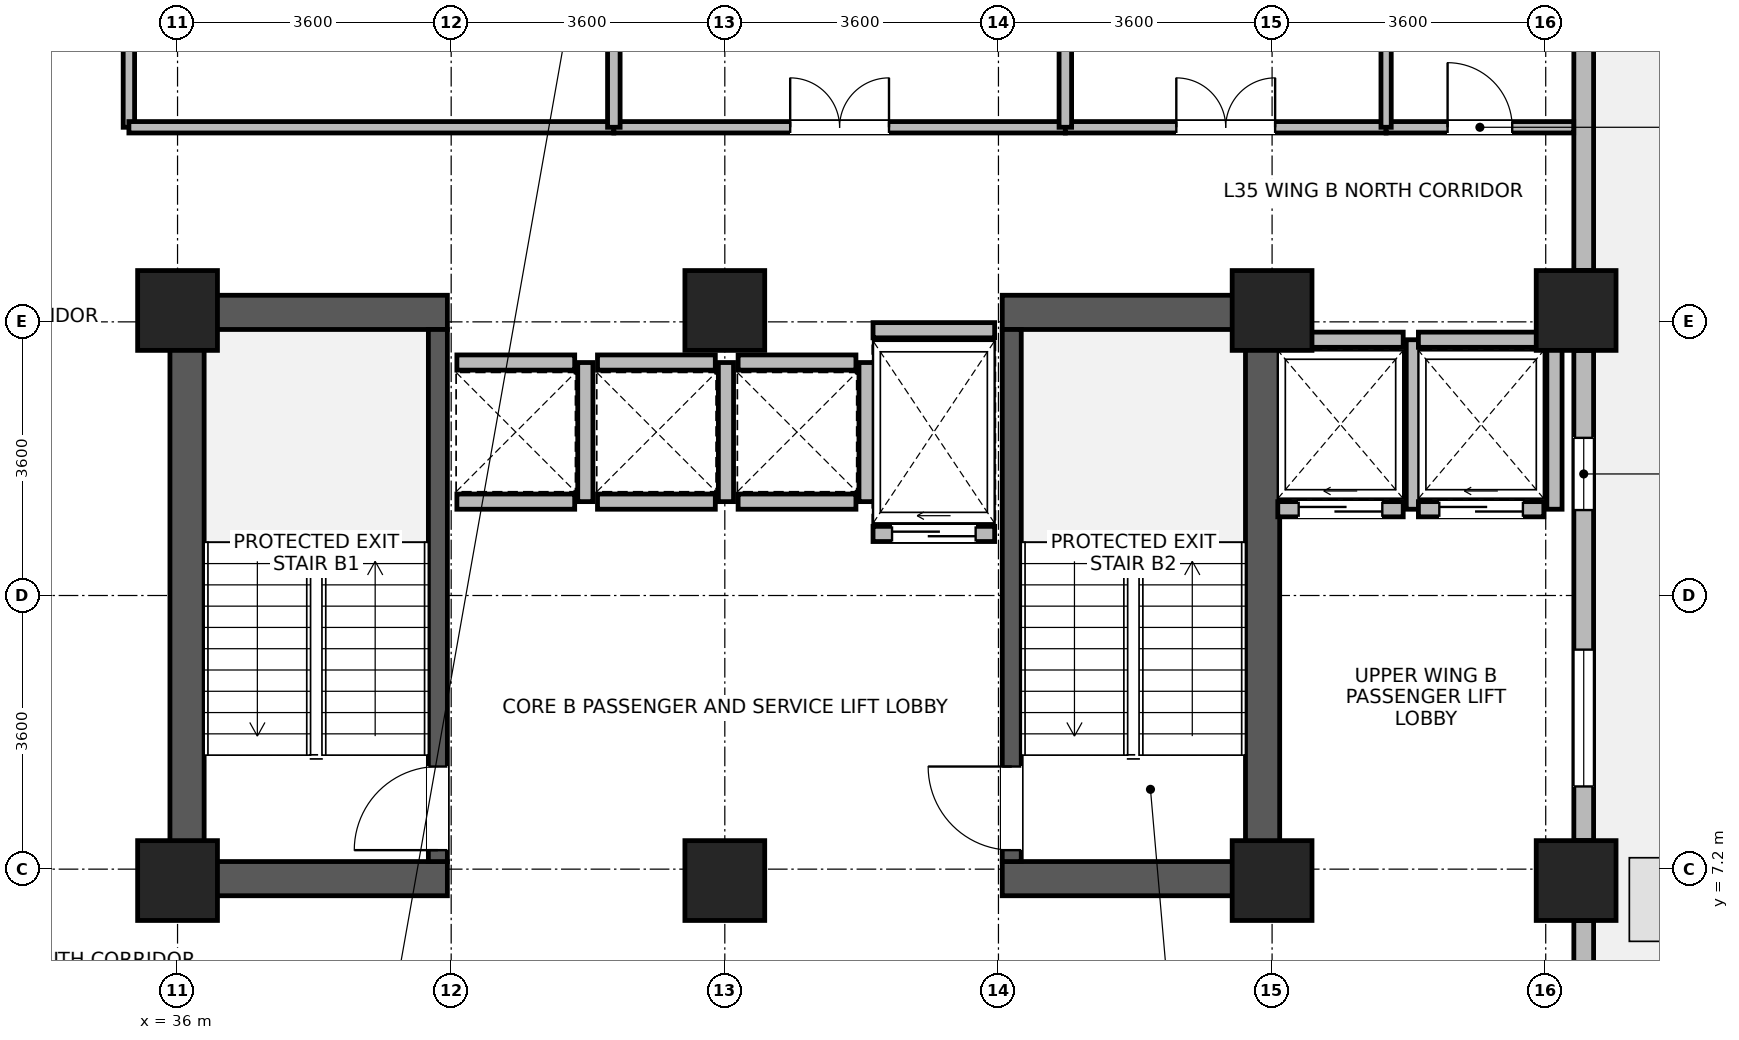
"""IFC4 building model, lengths in metres.
Left out: names, types, materials, properties, quantities, classifications, styles, units other than length and angle.
Written with IfcOpenShell. Run it as: python <this file> out.ifc"""

import sys

from ifc_helpers import new_model, si_unit, direction, frame, frame_2d, origin, origin_2d, place, context, subcontext, project, spatial, rectangle, extrude, source, transform, mapped, element, fill, save


model = new_model("IFC4")
c1 = context("Model", 3, precision=1e-05, world=origin(), true_north=direction((0.0, 1.0)))
c2 = subcontext(c1, "Body", "Model", "MODEL_VIEW")
j1 = project(units=[si_unit("LENGTHUNIT", "METRE"), si_unit("PLANEANGLEUNIT", "RADIAN")], contexts=[c1])
p1 = place(None, origin())
s1 = spatial("IfcSite", under=j1, at=p1, CompositionType="ELEMENT")
p2 = place(p1, origin())
s2 = spatial("IfcBuilding", under=s1, at=p2, CompositionType="ELEMENT")
p3 = place(p2, frame((0.0, 0.0, 140.2)))
s3 = spatial("IfcBuildingStorey", under=s2, at=p3, CompositionType="ELEMENT", Elevation=140.2)
for number, where, z_axis, x_axis in (
    (1, (36.125, 6.85, 0.0), (0.0, 0.0, 1.0), (0.0, 1.0, 0.0)),
    (2, (50.275, 6.85, 0.0), (0.0, 0.0, 1.0), (0.0, 1.0, 0.0)),
):
    element("IfcWall", number, at=place(p3, frame(where, z_axis=z_axis, x_axis=x_axis)), inside=s3, PredefinedType="SHEAR", context=c2, shape_type="SweptSolid", body=[
        extrude(rectangle(XDim=7.9, YDim=0.45, at=frame_2d((3.95, 0.0))), origin(), (0.0, 0.0, 1.0), 3.46),
    ])
for number, where, z_axis, x_axis in (
    (3, (36.35, 7.075, 0.0), (0.0, 0.0, 1.0), (1.0, 0.0, 0.0)),
    (4, (46.85, 7.075, 0.0), (0.0, 0.0, 1.0), (1.0, 0.0, 0.0)),
    (5, (36.35, 14.525, 0.0), (0.0, 0.0, 1.0), (1.0, 0.0, 0.0)),
    (6, (46.85, 14.525, 0.0), (0.0, 0.0, 1.0), (1.0, 0.0, 0.0)),
):
    element("IfcWall", number, at=place(p3, frame(where, z_axis=z_axis, x_axis=x_axis)), inside=s3, PredefinedType="SHEAR", context=c2, shape_type="SweptSolid", body=[
        extrude(rectangle(XDim=3.2, YDim=0.45, at=frame_2d((1.6, 0.0))), origin(), (0.0, 0.0, 1.0), 3.46),
    ])
p4 = place(p3, frame((39.425, 7.3, 0.0), z_axis=(0.0, 0.0, 1.0), x_axis=(0.0, 1.0, 0.0)))
e7 = element("IfcWall", 7, at=p4, inside=s3, PredefinedType="SHEAR", context=c2, shape_type="SweptSolid", body=[
    extrude(rectangle(XDim=7.0, YDim=0.25, at=frame_2d((3.5, 0.0))), origin(), (0.0, 0.0, 1.0), 3.46),
])
p5 = place(p4, frame((0.15, 0.0, 0.0)))
e8 = element("IfcOpeningElement", 8, at=p5, cuts=e7, PredefinedType="OPENING", context=c2, shape_type="SweptSolid", body=[
    extrude(rectangle(XDim=1.1, YDim=2.08, at=frame_2d((0.55, 1.04))), frame((0.0, 0.135, 0.0), z_axis=(0.0, -1.0, 0.0), x_axis=(1.0, 0.0, 0.0)), (0.0, 0.0, 1.0), 0.27),
])
p6 = place(p3, frame((46.975, 7.3, 0.0), z_axis=(0.0, 0.0, 1.0), x_axis=(0.0, 1.0, 0.0)))
e9 = element("IfcWall", 9, at=p6, inside=s3, PredefinedType="SHEAR", context=c2, shape_type="SweptSolid", body=[
    extrude(rectangle(XDim=7.0, YDim=0.25, at=frame_2d((3.5, 0.0))), origin(), (0.0, 0.0, 1.0), 3.46),
])
p7 = place(p6, frame((0.15, 0.0, 0.0)))
e10 = element("IfcOpeningElement", 10, at=p7, cuts=e9, PredefinedType="OPENING", context=c2, shape_type="SweptSolid", body=[
    extrude(rectangle(XDim=1.1, YDim=2.08, at=frame_2d((0.55, 1.04))), frame((0.0, 0.135, 0.0), z_axis=(0.0, -1.0, 0.0), x_axis=(1.0, 0.0, 0.0)), (0.0, 0.0, 1.0), 0.27),
])
m1 = source(origin(), c2, "Body", "SweptSolid", [
    extrude(rectangle(XDim=1.05, YDim=1.05, at=origin_2d()), origin(), (0.0, 0.0, 1.0), 3.7),
])
for number, where, z_axis, x_axis in (
    (11, (36.0, 7.05, 0.0), (0.0, 0.0, 1.0), (1.0, 0.0, 0.0)),
    (12, (36.0, 14.55, 0.0), (0.0, 0.0, 1.0), (1.0, 0.0, 0.0)),
    (13, (43.2, 7.05, 0.0), (0.0, 0.0, 1.0), (1.0, 0.0, 0.0)),
    (14, (43.2, 14.55, 0.0), (0.0, 0.0, 1.0), (1.0, 0.0, 0.0)),
    (15, (50.4, 7.05, 0.0), (0.0, 0.0, 1.0), (1.0, 0.0, 0.0)),
    (16, (50.4, 14.55, 0.0), (0.0, 0.0, 1.0), (1.0, 0.0, 0.0)),
    (17, (54.4, 7.05, 0.0), (0.0, 0.0, 1.0), (1.0, 0.0, 0.0)),
    (18, (54.4, 14.55, 0.0), (0.0, 0.0, 1.0), (1.0, 0.0, 0.0)),
):
    element("IfcColumn", number, at=place(p3, frame(where, z_axis=z_axis, x_axis=x_axis)), inside=s3, PredefinedType="COLUMN", context=c2, shape_type="MappedRepresentation", body=[
        mapped(m1, transform((0.0, 0.0, 0.0), x_axis=(1.0, 0.0, 0.0), y_axis=(0.0, 1.0, 0.0), z_axis=(0.0, 0.0, 1.0), scale=1.0)),
    ])
p8 = place(p3, frame((54.5, 6.524, 0.0), z_axis=(0.0, 0.0, 1.0), x_axis=(0.0, -1.0, 0.0)))
e19 = element("IfcWall", 19, at=p8, inside=s3, PredefinedType="STANDARD", context=c2, shape_type="SweptSolid", body=[
    extrude(rectangle(XDim=4.854, YDim=0.26, at=frame_2d((2.427, 0.0))), origin(), (0.0, 0.0, 1.0), 3.44),
])
p9 = place(p8, frame((2.648, 0.0, 0.0)))
e20 = element("IfcOpeningElement", 20, at=p9, cuts=e19, PredefinedType="OPENING", context=c2, shape_type="SweptSolid", body=[
    extrude(rectangle(XDim=1.5, YDim=2.15, at=frame_2d((0.75, 1.075))), frame((0.0, 0.14, 0.0), z_axis=(0.0, -1.0, 0.0), x_axis=(1.0, 0.0, 0.0)), (0.0, 0.0, 1.0), 0.28),
])
p10 = place(p3, frame((54.5, 14.024, 0.0), z_axis=(0.0, 0.0, 1.0), x_axis=(0.0, -1.0, 0.0)))
e21 = element("IfcWall", 21, at=p10, inside=s3, PredefinedType="STANDARD", context=c2, shape_type="SweptSolid", body=[
    extrude(rectangle(XDim=6.448, YDim=0.26, at=frame_2d((3.224, 0.0))), origin(), (0.0, 0.0, 1.0), 2.99),
])
p11 = place(p10, frame((3.936, 0.0, 0.85)))
e22 = element("IfcOpeningElement", 22, at=p11, cuts=e21, PredefinedType="OPENING", context=c2, shape_type="SweptSolid", body=[
    extrude(rectangle(XDim=1.8, YDim=1.85, at=frame_2d((0.9, 0.925))), frame((0.0, 0.14, 0.0), z_axis=(0.0, -1.0, 0.0), x_axis=(1.0, 0.0, 0.0)), (0.0, 0.0, 1.0), 0.28),
])
p12 = place(p10, frame((1.15, 0.0, 0.85)))
e23 = element("IfcOpeningElement", 23, at=p12, cuts=e21, PredefinedType="OPENING", context=c2, shape_type="SweptSolid", body=[
    extrude(rectangle(XDim=0.95, YDim=1.75, at=frame_2d((0.475, 0.875))), frame((0.0, 0.14, 0.0), z_axis=(0.0, -1.0, 0.0), x_axis=(1.0, 0.0, 0.0)), (0.0, 0.0, 1.0), 0.28),
])
p13 = place(p3, frame((54.5, 21.074, 0.0), z_axis=(0.0, 0.0, 1.0), x_axis=(0.0, -1.0, 0.0)))
e24 = element("IfcWall", 24, at=p13, inside=s3, PredefinedType="STANDARD", context=c2, shape_type="SweptSolid", body=[
    extrude(rectangle(XDim=5.998, YDim=0.26, at=frame_2d((2.999, 0.0))), origin(), (0.0, 0.0, 1.0), 2.99),
])
p14 = place(p13, frame((0.6, 0.0, 0.85)))
e25 = element("IfcOpeningElement", 25, at=p14, cuts=e24, PredefinedType="OPENING", context=c2, shape_type="SweptSolid", body=[
    extrude(rectangle(XDim=1.8, YDim=1.85, at=frame_2d((0.9, 0.925))), frame((0.0, 0.14, 0.0), z_axis=(0.0, -1.0, 0.0), x_axis=(1.0, 0.0, 0.0)), (0.0, 0.0, 1.0), 0.28),
])
for number, where, z_axis, x_axis in (
    (26, (39.675, 12.035, 0.0), (0.0, 0.0, 1.0), (1.0, 0.0, 0.0)),
    (27, (39.675, 13.865, 0.0), (0.0, 0.0, 1.0), (1.0, 0.0, 0.0)),
):
    element("IfcWall", number, at=place(p3, frame(where, z_axis=z_axis, x_axis=x_axis)), inside=s3, PredefinedType="PARTITIONING", context=c2, shape_type="SweptSolid", body=[
        extrude(rectangle(XDim=1.55, YDim=0.2, at=frame_2d((0.775, 0.0))), origin(), (0.0, 0.0, 1.0), 3.44),
    ])
p15 = place(p3, frame((41.365, 12.035, 0.0), z_axis=(0.0, 0.0, 1.0), x_axis=(0.0, 1.0, 0.0)))
e28 = element("IfcWall", 28, at=p15, inside=s3, PredefinedType="PARTITIONING", context=c2, shape_type="SweptSolid", body=[
    extrude(rectangle(XDim=1.83, YDim=0.2, at=frame_2d((0.915, 0.0))), origin(), (0.0, 0.0, 1.0), 3.44),
])
for number, where, z_axis, x_axis in (
    (29, (41.525, 12.035, 0.0), (0.0, 0.0, 1.0), (1.0, 0.0, 0.0)),
    (30, (41.525, 13.865, 0.0), (0.0, 0.0, 1.0), (1.0, 0.0, 0.0)),
):
    element("IfcWall", number, at=place(p3, frame(where, z_axis=z_axis, x_axis=x_axis)), inside=s3, PredefinedType="PARTITIONING", context=c2, shape_type="SweptSolid", body=[
        extrude(rectangle(XDim=1.55, YDim=0.2, at=frame_2d((0.775, 0.0))), origin(), (0.0, 0.0, 1.0), 3.44),
    ])
p16 = place(p3, frame((43.215, 12.035, 0.0), z_axis=(0.0, 0.0, 1.0), x_axis=(0.0, 1.0, 0.0)))
e31 = element("IfcWall", 31, at=p16, inside=s3, PredefinedType="PARTITIONING", context=c2, shape_type="SweptSolid", body=[
    extrude(rectangle(XDim=1.83, YDim=0.2, at=frame_2d((0.915, 0.0))), origin(), (0.0, 0.0, 1.0), 3.44),
])
for number, where, z_axis, x_axis in (
    (32, (43.375, 12.035, 0.0), (0.0, 0.0, 1.0), (1.0, 0.0, 0.0)),
    (33, (43.375, 13.865, 0.0), (0.0, 0.0, 1.0), (1.0, 0.0, 0.0)),
):
    element("IfcWall", number, at=place(p3, frame(where, z_axis=z_axis, x_axis=x_axis)), inside=s3, PredefinedType="PARTITIONING", context=c2, shape_type="SweptSolid", body=[
        extrude(rectangle(XDim=1.55, YDim=0.2, at=frame_2d((0.775, 0.0))), origin(), (0.0, 0.0, 1.0), 3.44),
    ])
p17 = place(p3, frame((45.065, 12.035, 0.0), z_axis=(0.0, 0.0, 1.0), x_axis=(0.0, 1.0, 0.0)))
e34 = element("IfcWall", 34, at=p17, inside=s3, PredefinedType="PARTITIONING", context=c2, shape_type="SweptSolid", body=[
    extrude(rectangle(XDim=1.83, YDim=0.2, at=frame_2d((0.915, 0.0))), origin(), (0.0, 0.0, 1.0), 3.44),
])
p18 = place(p3, frame((50.475, 11.935, 0.0), z_axis=(0.0, 0.0, 1.0), x_axis=(1.0, 0.0, 0.0)))
e35 = element("IfcWall", 35, at=p18, inside=s3, PredefinedType="PARTITIONING", context=c2, shape_type="SweptSolid", body=[
    extrude(rectangle(XDim=1.65, YDim=0.2, at=frame_2d((0.825, 0.0))), origin(), (0.0, 0.0, 1.0), 3.44),
])
p19 = place(p18, frame((0.275, 0.0, 0.0)))
e36 = element("IfcOpeningElement", 36, at=p19, cuts=e35, PredefinedType="OPENING", context=c2, shape_type="SweptSolid", body=[
    extrude(rectangle(XDim=1.1, YDim=2.12, at=frame_2d((0.55, 1.06))), frame((0.0, 0.11, 0.0), z_axis=(0.0, -1.0, 0.0), x_axis=(1.0, 0.0, 0.0)), (0.0, 0.0, 1.0), 0.22),
])
p20 = place(p3, frame((50.475, 14.165, 0.0), z_axis=(0.0, 0.0, 1.0), x_axis=(1.0, 0.0, 0.0)))
e37 = element("IfcWall", 37, at=p20, inside=s3, PredefinedType="PARTITIONING", context=c2, shape_type="SweptSolid", body=[
    extrude(rectangle(XDim=1.65, YDim=0.2, at=frame_2d((0.825, 0.0))), origin(), (0.0, 0.0, 1.0), 3.44),
])
p21 = place(p3, frame((52.265, 11.935, 0.0), z_axis=(0.0, 0.0, 1.0), x_axis=(0.0, 1.0, 0.0)))
e38 = element("IfcWall", 38, at=p21, inside=s3, PredefinedType="PARTITIONING", context=c2, shape_type="SweptSolid", body=[
    extrude(rectangle(XDim=2.23, YDim=0.2, at=frame_2d((1.115, 0.0))), origin(), (0.0, 0.0, 1.0), 3.44),
])
p22 = place(p3, frame((52.325, 11.935, 0.0), z_axis=(0.0, 0.0, 1.0), x_axis=(1.0, 0.0, 0.0)))
e39 = element("IfcWall", 39, at=p22, inside=s3, PredefinedType="PARTITIONING", context=c2, shape_type="SweptSolid", body=[
    extrude(rectangle(XDim=1.65, YDim=0.2, at=frame_2d((0.825, 0.0))), origin(), (0.0, 0.0, 1.0), 3.44),
])
p23 = place(p22, frame((0.275, 0.0, 0.0)))
e40 = element("IfcOpeningElement", 40, at=p23, cuts=e39, PredefinedType="OPENING", context=c2, shape_type="SweptSolid", body=[
    extrude(rectangle(XDim=1.1, YDim=2.12, at=frame_2d((0.55, 1.06))), frame((0.0, 0.11, 0.0), z_axis=(0.0, -1.0, 0.0), x_axis=(1.0, 0.0, 0.0)), (0.0, 0.0, 1.0), 0.22),
])
p24 = place(p3, frame((52.325, 14.165, 0.0), z_axis=(0.0, 0.0, 1.0), x_axis=(1.0, 0.0, 0.0)))
e41 = element("IfcWall", 41, at=p24, inside=s3, PredefinedType="PARTITIONING", context=c2, shape_type="SweptSolid", body=[
    extrude(rectangle(XDim=1.65, YDim=0.2, at=frame_2d((0.825, 0.0))), origin(), (0.0, 0.0, 1.0), 3.44),
])
p25 = place(p3, frame((54.115, 11.935, 0.0), z_axis=(0.0, 0.0, 1.0), x_axis=(0.0, 1.0, 0.0)))
e42 = element("IfcWall", 42, at=p25, inside=s3, PredefinedType="PARTITIONING", context=c2, shape_type="SweptSolid", body=[
    extrude(rectangle(XDim=2.23, YDim=0.2, at=frame_2d((1.115, 0.0))), origin(), (0.0, 0.0, 1.0), 2.99),
])
p26 = place(p3, frame((45.15, 11.61, 0.0), z_axis=(0.0, 0.0, 1.0), x_axis=(1.0, 0.0, 0.0)))
e43 = element("IfcWall", 43, at=p26, inside=s3, PredefinedType="PARTITIONING", context=c2, shape_type="SweptSolid", body=[
    extrude(rectangle(XDim=1.6, YDim=0.2, at=frame_2d((0.8, 0.0))), origin(), (0.0, 0.0, 1.0), 3.44),
])
p27 = place(p26, frame((0.25, 0.0, 0.0)))
e44 = element("IfcOpeningElement", 44, at=p27, cuts=e43, PredefinedType="OPENING", context=c2, shape_type="SweptSolid", body=[
    extrude(rectangle(XDim=1.1, YDim=2.12, at=frame_2d((0.55, 1.06))), frame((0.0, 0.11, 0.0), z_axis=(0.0, -1.0, 0.0), x_axis=(1.0, 0.0, 0.0)), (0.0, 0.0, 1.0), 0.22),
])
p28 = place(p3, frame((45.15, 14.29, 0.0), z_axis=(0.0, 0.0, 1.0), x_axis=(1.0, 0.0, 0.0)))
e45 = element("IfcWall", 45, at=p28, inside=s3, PredefinedType="PARTITIONING", context=c2, shape_type="SweptSolid", body=[
    extrude(rectangle(XDim=1.6, YDim=0.2, at=frame_2d((0.8, 0.0))), origin(), (0.0, 0.0, 1.0), 2.44),
])
p29 = place(p3, frame((35.36, 16.96, 0.0), z_axis=(0.0, 0.0, 1.0), x_axis=(0.0, 1.0, 0.0)))
e46 = element("IfcWall", 46, at=p29, inside=s3, PredefinedType="PARTITIONING", context=c2, shape_type="SweptSolid", body=[
    extrude(rectangle(XDim=9.64, YDim=0.15, at=frame_2d((4.82, 0.0))), origin(), (0.0, 0.0, 1.0), 3.44),
])
p30 = place(p29, frame((5.334, 0.0, 0.0)))
e47 = element("IfcOpeningElement", 47, at=p30, cuts=e46, PredefinedType="OPENING", context=c2, shape_type="SweptSolid", body=[
    extrude(rectangle(XDim=0.9, YDim=2.08, at=frame_2d((0.45, 1.04))), frame((0.0, 0.085, 0.0), z_axis=(0.0, -1.0, 0.0), x_axis=(1.0, 0.0, 0.0)), (0.0, 0.0, 1.0), 0.17),
])
p31 = place(p3, frame((35.36, 16.96, 0.0), z_axis=(0.0, 0.0, 1.0), x_axis=(1.0, 0.0, 0.0)))
e48 = element("IfcWall", 48, at=p31, inside=s3, PredefinedType="PARTITIONING", context=c2, shape_type="SweptSolid", body=[
    extrude(rectangle(XDim=6.38, YDim=0.15, at=frame_2d((3.19, 0.0))), origin(), (0.0, 0.0, 1.0), 3.44),
])
p32 = place(p3, frame((41.74, 16.96, 0.0), z_axis=(0.0, 0.0, 1.0), x_axis=(1.0, 0.0, 0.0)))
e49 = element("IfcWall", 49, at=p32, inside=s3, PredefinedType="PARTITIONING", context=c2, shape_type="SweptSolid", body=[
    extrude(rectangle(XDim=5.94, YDim=0.15, at=frame_2d((2.97, 0.0))), origin(), (0.0, 0.0, 1.0), 3.44),
])
p33 = place(p32, frame((2.32, 0.0, 0.0)))
e50 = element("IfcOpeningElement", 50, at=p33, cuts=e49, PredefinedType="OPENING", context=c2, shape_type="SweptSolid", body=[
    extrude(rectangle(XDim=1.3, YDim=2.12, at=frame_2d((0.65, 1.06))), frame((0.0, 0.085, 0.0), z_axis=(0.0, -1.0, 0.0), x_axis=(1.0, 0.0, 0.0)), (0.0, 0.0, 1.0), 0.17),
])
p34 = place(p3, frame((47.68, 16.96, 0.0), z_axis=(0.0, 0.0, 1.0), x_axis=(1.0, 0.0, 0.0)))
e51 = element("IfcWall", 51, at=p34, inside=s3, PredefinedType="PARTITIONING", context=c2, shape_type="SweptSolid", body=[
    extrude(rectangle(XDim=4.22, YDim=0.15, at=frame_2d((2.11, 0.0))), origin(), (0.0, 0.0, 1.0), 3.44),
])
p35 = place(p34, frame((1.46, 0.0, 0.0)))
e52 = element("IfcOpeningElement", 52, at=p35, cuts=e51, PredefinedType="OPENING", context=c2, shape_type="SweptSolid", body=[
    extrude(rectangle(XDim=1.3, YDim=2.12, at=frame_2d((0.65, 1.06))), frame((0.0, 0.085, 0.0), z_axis=(0.0, -1.0, 0.0), x_axis=(1.0, 0.0, 0.0)), (0.0, 0.0, 1.0), 0.17),
])
p36 = place(p3, frame((51.9, 16.96, 0.0), z_axis=(0.0, 0.0, 1.0), x_axis=(1.0, 0.0, 0.0)))
e53 = element("IfcWall", 53, at=p36, inside=s3, PredefinedType="PARTITIONING", context=c2, shape_type="SweptSolid", body=[
    extrude(rectangle(XDim=2.468, YDim=0.15, at=frame_2d((1.234, 0.0))), origin(), (0.0, 0.0, 1.0), 3.44),
])
p37 = place(p36, frame((0.809, 0.0, 0.0)))
e54 = element("IfcOpeningElement", 54, at=p37, cuts=e53, PredefinedType="OPENING", context=c2, shape_type="SweptSolid", body=[
    extrude(rectangle(XDim=0.85, YDim=2.04, at=frame_2d((0.425, 1.02))), frame((0.0, 0.085, 0.0), z_axis=(0.0, -1.0, 0.0), x_axis=(1.0, 0.0, 0.0)), (0.0, 0.0, 1.0), 0.17),
])
for number, where, z_axis, x_axis in (
    (55, (41.74, 16.96, 0.0), (0.0, 0.0, 1.0), (0.0, 1.0, 0.0)),
    (56, (47.68, 16.96, 0.0), (0.0, 0.0, 1.0), (0.0, 1.0, 0.0)),
):
    element("IfcWall", number, at=place(p3, frame(where, z_axis=z_axis, x_axis=x_axis)), inside=s3, PredefinedType="PARTITIONING", context=c2, shape_type="SweptSolid", body=[
        extrude(rectangle(XDim=9.64, YDim=0.165, at=frame_2d((4.82, 0.0))), origin(), (0.0, 0.0, 1.0), 3.44),
    ])
p38 = place(p3, frame((51.9, 16.96, 0.0), z_axis=(0.0, 0.0, 1.0), x_axis=(0.0, 1.0, 0.0)))
e57 = element("IfcWall", 57, at=p38, inside=s3, PredefinedType="PARTITIONING", context=c2, shape_type="SweptSolid", body=[
    extrude(rectangle(XDim=9.64, YDim=0.135, at=frame_2d((4.82, 0.0))), origin(), (0.0, 0.0, 1.0), 3.44),
])
p39 = place(p11, origin())
e58 = element("IfcWindow", 58, at=p39, inside=s3, PartitioningType="SINGLE_PANEL", PredefinedType="WINDOW", context=c2, shape_type="SweptSolid", body=[
    extrude(rectangle(XDim=1.8, YDim=1.85, at=frame_2d((0.9, 0.925))), frame((0.0, 0.03, 0.0), z_axis=(0.0, -1.0, 0.0), x_axis=(1.0, 0.0, 0.0)), (0.0, 0.0, 1.0), 0.06),
])
fill(e22, e58)
p40 = place(p12, origin())
e59 = element("IfcWindow", 59, at=p40, inside=s3, PartitioningType="SINGLE_PANEL", PredefinedType="WINDOW", context=c2, shape_type="SweptSolid", body=[
    extrude(rectangle(XDim=0.95, YDim=1.75, at=frame_2d((0.475, 0.875))), frame((0.0, 0.03, 0.0), z_axis=(0.0, -1.0, 0.0), x_axis=(1.0, 0.0, 0.0)), (0.0, 0.0, 1.0), 0.06),
])
fill(e23, e59)
p41 = place(p5, origin())
e60 = element("IfcDoor", 60, at=p41, inside=s3, OperationType="SINGLE_SWING_LEFT", PredefinedType="DOOR", context=c2, shape_type="SweptSolid", body=[
    extrude(rectangle(XDim=1.1, YDim=2.08, at=frame_2d((0.55, 1.04))), frame((0.0, 0.025, 0.0), z_axis=(0.0, -1.0, 0.0), x_axis=(1.0, 0.0, 0.0)), (0.0, 0.0, 1.0), 0.05),
])
fill(e8, e60)
p42 = place(p7, origin())
e61 = element("IfcDoor", 61, at=p42, inside=s3, OperationType="SINGLE_SWING_RIGHT", PredefinedType="DOOR", context=c2, shape_type="SweptSolid", body=[
    extrude(rectangle(XDim=1.1, YDim=2.08, at=frame_2d((0.55, 1.04))), frame((0.0, 0.025, 0.0), z_axis=(0.0, -1.0, 0.0), x_axis=(1.0, 0.0, 0.0)), (0.0, 0.0, 1.0), 0.05),
])
fill(e10, e61)
p43 = place(p19, origin())
e62 = element("IfcDoor", 62, at=p43, inside=s3, OperationType="SLIDING_TO_LEFT", PredefinedType="DOOR", context=c2, shape_type="SweptSolid", body=[
    extrude(rectangle(XDim=1.1, YDim=2.12, at=frame_2d((0.55, 1.06))), frame((0.0, 0.025, 0.0), z_axis=(0.0, -1.0, 0.0), x_axis=(1.0, 0.0, 0.0)), (0.0, 0.0, 1.0), 0.05),
])
fill(e36, e62)
p44 = place(p23, origin())
e63 = element("IfcDoor", 63, at=p44, inside=s3, OperationType="SLIDING_TO_LEFT", PredefinedType="DOOR", context=c2, shape_type="SweptSolid", body=[
    extrude(rectangle(XDim=1.1, YDim=2.12, at=frame_2d((0.55, 1.06))), frame((0.0, 0.025, 0.0), z_axis=(0.0, -1.0, 0.0), x_axis=(1.0, 0.0, 0.0)), (0.0, 0.0, 1.0), 0.05),
])
fill(e40, e63)
p45 = place(p27, origin())
e64 = element("IfcDoor", 64, at=p45, inside=s3, OperationType="SLIDING_TO_LEFT", PredefinedType="DOOR", context=c2, shape_type="SweptSolid", body=[
    extrude(rectangle(XDim=1.1, YDim=2.12, at=frame_2d((0.55, 1.06))), frame((0.0, 0.025, 0.0), z_axis=(0.0, -1.0, 0.0), x_axis=(1.0, 0.0, 0.0)), (0.0, 0.0, 1.0), 0.05),
])
fill(e44, e64)
p46 = place(p33, origin())
e65 = element("IfcDoor", 65, at=p46, inside=s3, OperationType="DOUBLE_DOOR_SINGLE_SWING", PredefinedType="DOOR", context=c2, shape_type="SweptSolid", body=[
    extrude(rectangle(XDim=1.3, YDim=2.12, at=frame_2d((0.65, 1.06))), frame((0.0, 0.025, 0.0), z_axis=(0.0, -1.0, 0.0), x_axis=(1.0, 0.0, 0.0)), (0.0, 0.0, 1.0), 0.05),
])
fill(e50, e65)
p47 = place(p35, origin())
e66 = element("IfcDoor", 66, at=p47, inside=s3, OperationType="DOUBLE_DOOR_SINGLE_SWING", PredefinedType="DOOR", context=c2, shape_type="SweptSolid", body=[
    extrude(rectangle(XDim=1.3, YDim=2.12, at=frame_2d((0.65, 1.06))), frame((0.0, 0.025, 0.0), z_axis=(0.0, -1.0, 0.0), x_axis=(1.0, 0.0, 0.0)), (0.0, 0.0, 1.0), 0.05),
])
fill(e52, e66)
p48 = place(p37, origin())
e67 = element("IfcDoor", 67, at=p48, inside=s3, OperationType="SINGLE_SWING_LEFT", PredefinedType="DOOR", context=c2, shape_type="SweptSolid", body=[
    extrude(rectangle(XDim=0.85, YDim=2.04, at=frame_2d((0.425, 1.02))), frame((0.0, 0.025, 0.0), z_axis=(0.0, -1.0, 0.0), x_axis=(1.0, 0.0, 0.0)), (0.0, 0.0, 1.0), 0.05),
])
fill(e54, e67)
save(model, sys.argv[1])
